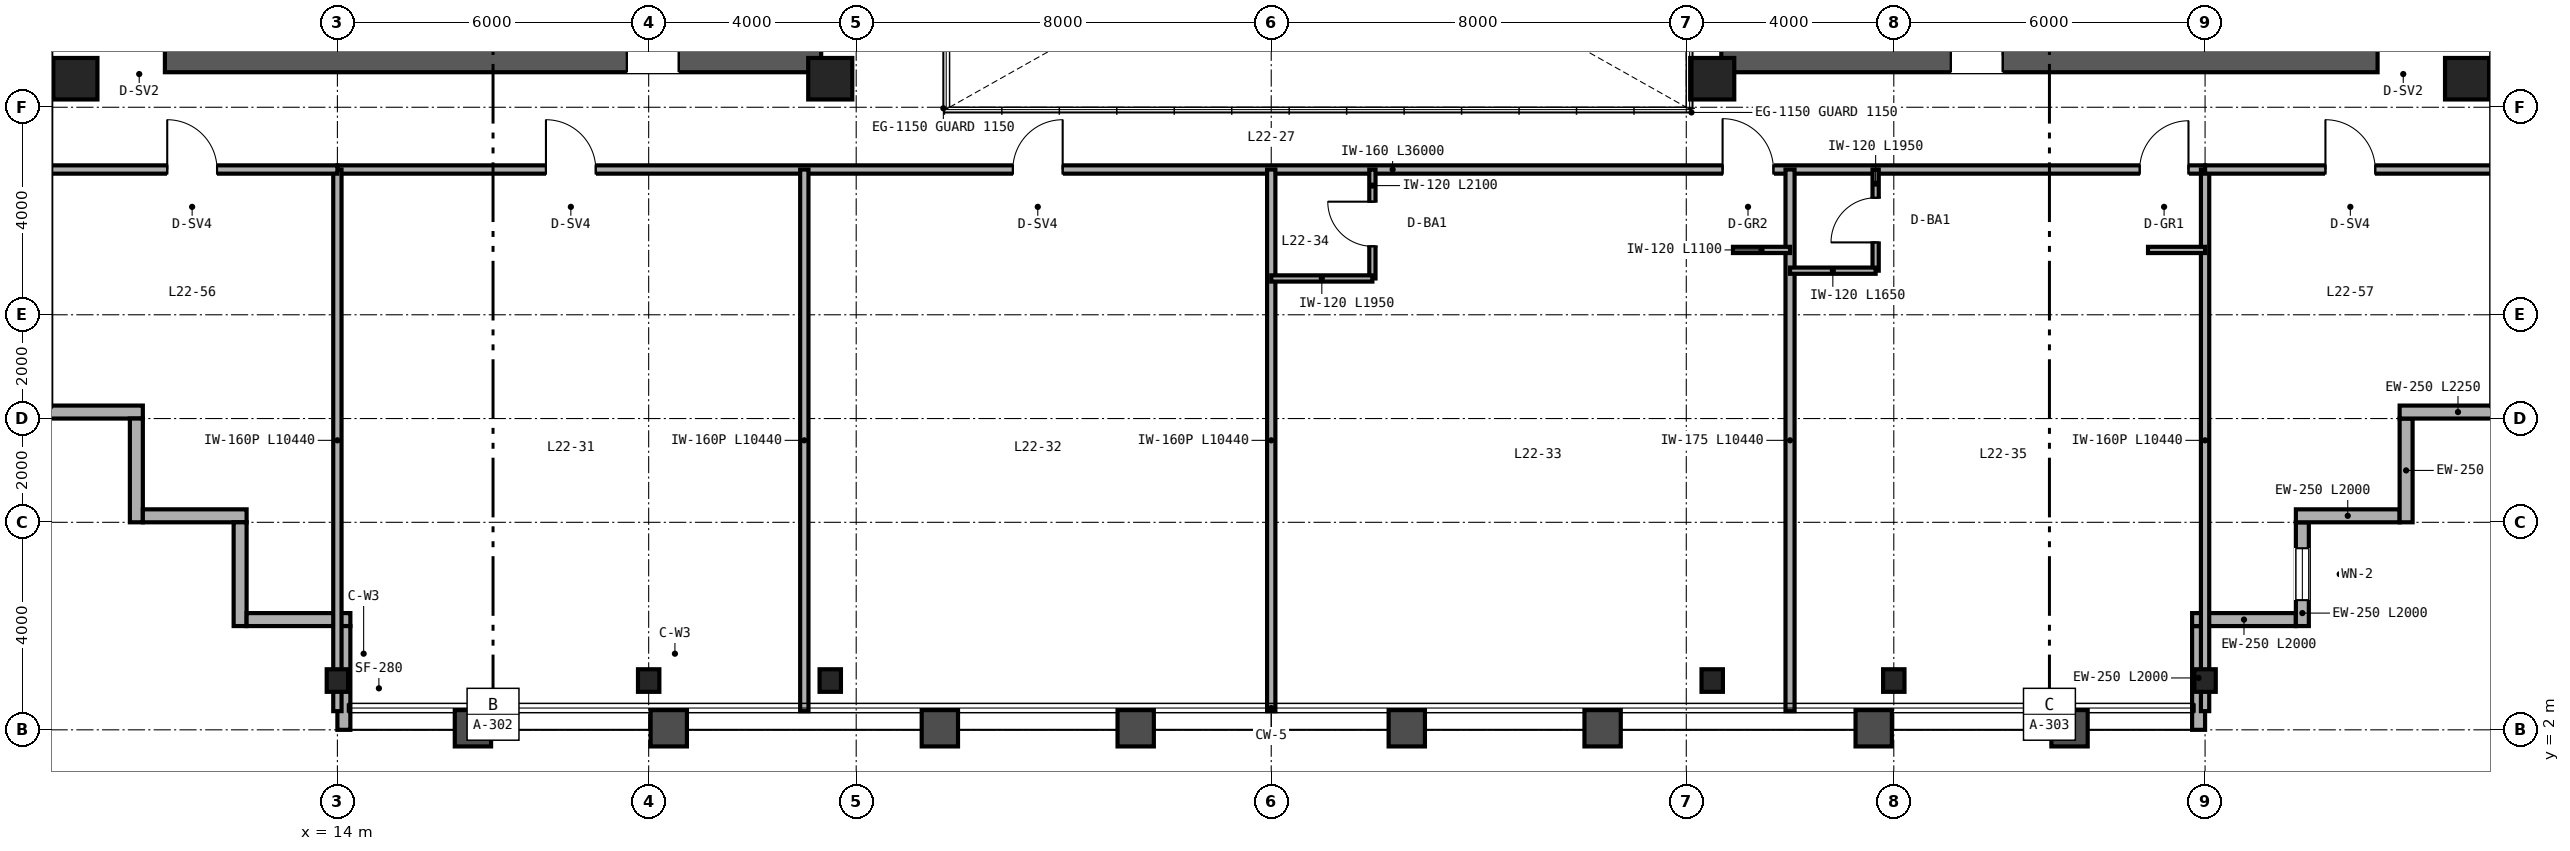
"""IFC4 building model, lengths in metres.
Left out: names, types, materials, properties, quantities, classifications, styles, units other than length and angle.
Written with IfcOpenShell. Run it as: python <this file> out.ifc"""

import sys

from ifc_helpers import new_model, si_unit, direction, frame, frame_2d, origin, origin_2d, place, context, subcontext, project, spatial, rectangle, hollow_rectangle, i_section, extrude, source, transform, mapped, element, fill, save


model = new_model("IFC4")
c1 = context("Model", 3, precision=1e-05, world=origin(), true_north=direction((0.0, 1.0)))
c2 = subcontext(c1, "Body", "Model", "MODEL_VIEW")
j1 = project(units=[si_unit("LENGTHUNIT", "METRE"), si_unit("PLANEANGLEUNIT", "RADIAN")], contexts=[c1])
p1 = place(None, origin())
s1 = spatial("IfcSite", under=j1, at=p1, CompositionType="ELEMENT")
p2 = place(p1, origin())
s2 = spatial("IfcBuilding", under=s1, at=p2, CompositionType="ELEMENT")
p3 = place(p2, frame((0.0, 0.0, 92.4)))
s3 = spatial("IfcBuildingStorey", under=s2, at=p3, CompositionType="ELEMENT", Elevation=92.4)
p4 = place(p3, frame((10.675, 15.0, 0.0), z_axis=(0.0, 0.0, 1.0), x_axis=(1.0, 0.0, 0.0)))
e1 = element("IfcWall", 1, at=p4, inside=s3, PredefinedType="SHEAR", context=c2, shape_type="SweptSolid", body=[
    extrude(rectangle(XDim=12.65, YDim=0.65, at=frame_2d((6.325, 0.0))), origin(), (0.0, 0.0, 1.0), 4.56),
])
p5 = place(p4, frame((8.905, 0.0, 0.0)))
e2 = element("IfcOpeningElement", 2, at=p5, cuts=e1, PredefinedType="OPENING", context=c2, shape_type="SweptSolid", body=[
    extrude(rectangle(XDim=1.0, YDim=2.15, at=frame_2d((0.5, 1.075))), frame((0.0, 0.335, 0.0), z_axis=(0.0, -1.0, 0.0), x_axis=(1.0, 0.0, 0.0)), (0.0, 0.0, 1.0), 0.67),
])
p6 = place(p3, frame((40.675, 15.0, 0.0), z_axis=(0.0, 0.0, 1.0), x_axis=(1.0, 0.0, 0.0)))
e3 = element("IfcWall", 3, at=p6, inside=s3, PredefinedType="SHEAR", context=c2, shape_type="SweptSolid", body=[
    extrude(rectangle(XDim=12.65, YDim=0.65, at=frame_2d((6.325, 0.0))), origin(), (0.0, 0.0, 1.0), 4.56),
])
p7 = place(p6, frame((4.425, 0.0, 0.0)))
e4 = element("IfcOpeningElement", 4, at=p7, cuts=e3, PredefinedType="OPENING", context=c2, shape_type="SweptSolid", body=[
    extrude(rectangle(XDim=1.0, YDim=2.15, at=frame_2d((0.5, 1.075))), frame((0.0, 0.335, 0.0), z_axis=(0.0, -1.0, 0.0), x_axis=(1.0, 0.0, 0.0)), (0.0, 0.0, 1.0), 0.67),
])
m1 = source(origin(), c2, "Body", "SweptSolid", [
    extrude(hollow_rectangle(XDim=0.85, YDim=0.8, WallThickness=0.032, at=origin_2d()), origin(), (0.0, 0.0, 1.0), 4.56),
])
for number, where, z_axis, x_axis in (
    (5, (8.95, 14.55, 0.0), (0.0, 0.0, 1.0), (1.0, 0.0, 0.0)),
    (6, (23.5, 14.55, 0.0), (0.0, 0.0, 1.0), (1.0, 0.0, 0.0)),
    (7, (40.5, 14.55, 0.0), (0.0, 0.0, 1.0), (1.0, 0.0, 0.0)),
    (8, (55.05, 14.55, 0.0), (0.0, 0.0, 1.0), (1.0, 0.0, 0.0)),
):
    element("IfcColumn", number, at=place(p3, frame(where, z_axis=z_axis, x_axis=x_axis)), inside=s3, PredefinedType="COLUMN", context=c2, shape_type="MappedRepresentation", body=[
        mapped(m1, transform((0.0, 0.0, 0.0), scale=1.0)),
    ])
m2 = source(origin(), c2, "Body", "SweptSolid", [
    extrude(i_section(OverallWidth=0.412, OverallDepth=0.435, WebThickness=0.036, FlangeThickness=0.057, FilletRadius=0.025, at=origin_2d()), origin(), (0.0, 0.0, 1.0), 4.56),
])
for number, where, z_axis, x_axis in (
    (9, (14.0, 2.95, 0.0), (0.0, 0.0, 1.0), (1.0, 0.0, 0.0)),
    (10, (20.0, 2.95, 0.0), (0.0, 0.0, 1.0), (1.0, 0.0, 0.0)),
    (11, (23.5, 2.95, 0.0), (0.0, 0.0, 1.0), (1.0, 0.0, 0.0)),
    (12, (40.5, 2.95, 0.0), (0.0, 0.0, 1.0), (1.0, 0.0, 0.0)),
    (13, (44.0, 2.95, 0.0), (0.0, 0.0, 1.0), (1.0, 0.0, 0.0)),
    (14, (50.0, 2.95, 0.0), (0.0, 0.0, 1.0), (1.0, 0.0, 0.0)),
):
    element("IfcColumn", number, at=place(p3, frame(where, z_axis=z_axis, x_axis=x_axis)), inside=s3, PredefinedType="COLUMN", context=c2, shape_type="MappedRepresentation", body=[
        mapped(m2, transform((0.0, 0.0, 0.0), scale=1.0)),
    ])
p8 = place(p3, frame((49.875, 2.0, 0.0), z_axis=(0.0, 0.0, 1.0), x_axis=(0.0, 1.0, 0.0)))
e15 = element("IfcWall", 15, at=p8, inside=s3, PredefinedType="SOLIDWALL", context=c2, shape_type="SweptSolid", body=[
    extrude(rectangle(XDim=2.0, YDim=0.25, at=frame_2d((1.0, 0.0))), origin(), (0.0, 0.0, 1.0), 3.867),
])
p9 = place(p3, frame((49.75, 4.125, 0.0), z_axis=(0.0, 0.0, 1.0), x_axis=(1.0, 0.0, 0.0)))
e16 = element("IfcWall", 16, at=p9, inside=s3, PredefinedType="SOLIDWALL", context=c2, shape_type="SweptSolid", body=[
    extrude(rectangle(XDim=2.0, YDim=0.25, at=frame_2d((1.0, 0.0))), origin(), (0.0, 0.0, 1.0), 4.56),
])
p10 = place(p3, frame((51.875, 4.0, 0.0), z_axis=(0.0, 0.0, 1.0), x_axis=(0.0, 1.0, 0.0)))
e17 = element("IfcWall", 17, at=p10, inside=s3, PredefinedType="SOLIDWALL", context=c2, shape_type="SweptSolid", body=[
    extrude(rectangle(XDim=2.0, YDim=0.25, at=frame_2d((1.0, 0.0))), origin(), (0.0, 0.0, 1.0), 4.56),
])
p11 = place(p10, frame((0.5, 0.0, 0.85)))
e18 = element("IfcOpeningElement", 18, at=p11, cuts=e17, PredefinedType="OPENING", context=c2, shape_type="SweptSolid", body=[
    extrude(rectangle(XDim=1.0, YDim=1.9, at=frame_2d((0.5, 0.95))), frame((0.0, 0.135, 0.0), z_axis=(0.0, -1.0, 0.0), x_axis=(1.0, 0.0, 0.0)), (0.0, 0.0, 1.0), 0.27),
])
for number, where, z_axis, x_axis in (
    (19, (51.75, 6.125, 0.0), (0.0, 0.0, 1.0), (1.0, 0.0, 0.0)),
    (20, (53.875, 6.0, 0.0), (0.0, 0.0, 1.0), (0.0, 1.0, 0.0)),
):
    element("IfcWall", number, at=place(p3, frame(where, z_axis=z_axis, x_axis=x_axis)), inside=s3, PredefinedType="SOLIDWALL", context=c2, shape_type="SweptSolid", body=[
        extrude(rectangle(XDim=2.0, YDim=0.25, at=frame_2d((1.0, 0.0))), origin(), (0.0, 0.0, 1.0), 4.56),
    ])
for number, where, z_axis, x_axis in (
    (21, (53.75, 8.125, 0.0), (0.0, 0.0, 1.0), (1.0, 0.0, 0.0)),
    (22, (8.0, 8.125, 0.0), (0.0, 0.0, 1.0), (1.0, 0.0, 0.0)),
):
    element("IfcWall", number, at=place(p3, frame(where, z_axis=z_axis, x_axis=x_axis)), inside=s3, PredefinedType="SOLIDWALL", context=c2, shape_type="SweptSolid", body=[
        extrude(rectangle(XDim=2.25, YDim=0.25, at=frame_2d((1.125, 0.0))), origin(), (0.0, 0.0, 1.0), 4.56),
    ])
for number, where, z_axis, x_axis in (
    (23, (10.125, 8.0, 0.0), (0.0, 0.0, 1.0), (0.0, -1.0, 0.0)),
    (24, (10.25, 6.125, 0.0), (0.0, 0.0, 1.0), (1.0, 0.0, 0.0)),
    (25, (12.125, 6.0, 0.0), (0.0, 0.0, 1.0), (0.0, -1.0, 0.0)),
    (26, (12.25, 4.125, 0.0), (0.0, 0.0, 1.0), (1.0, 0.0, 0.0)),
):
    element("IfcWall", number, at=place(p3, frame(where, z_axis=z_axis, x_axis=x_axis)), inside=s3, PredefinedType="SOLIDWALL", context=c2, shape_type="SweptSolid", body=[
        extrude(rectangle(XDim=2.0, YDim=0.25, at=frame_2d((1.0, 0.0))), origin(), (0.0, 0.0, 1.0), 4.56),
    ])
p12 = place(p3, frame((14.125, 4.0, 0.0), z_axis=(0.0, 0.0, 1.0), x_axis=(0.0, -1.0, 0.0)))
e27 = element("IfcWall", 27, at=p12, inside=s3, PredefinedType="SOLIDWALL", context=c2, shape_type="SweptSolid", body=[
    extrude(rectangle(XDim=2.0, YDim=0.25, at=frame_2d((1.0, 0.0))), origin(), (0.0, 0.0, 1.0), 3.867),
])
p13 = place(p3, frame((14.0, 12.8, 0.0), z_axis=(0.0, 0.0, 1.0), x_axis=(1.0, 0.0, 0.0)))
e28 = element("IfcWall", 28, at=p13, inside=s3, PredefinedType="PARTITIONING", context=c2, shape_type="SweptSolid", body=[
    extrude(rectangle(XDim=36.0, YDim=0.16, at=frame_2d((18.0, 0.0))), origin(), (0.0, 0.0, 1.0), 3.781),
])
p14 = place(p13, frame((4.02, 0.0, 0.0)))
e29 = element("IfcOpeningElement", 29, at=p14, cuts=e28, PredefinedType="OPENING", context=c2, shape_type="SweptSolid", body=[
    extrude(rectangle(XDim=0.96, YDim=2.15, at=frame_2d((0.48, 1.075))), frame((0.0, 0.09, 0.0), z_axis=(0.0, -1.0, 0.0), x_axis=(1.0, 0.0, 0.0)), (0.0, 0.0, 1.0), 0.18),
])
p15 = place(p13, frame((13.02, 0.0, 0.0)))
e30 = element("IfcOpeningElement", 30, at=p15, cuts=e28, PredefinedType="OPENING", context=c2, shape_type="SweptSolid", body=[
    extrude(rectangle(XDim=0.96, YDim=2.15, at=frame_2d((0.48, 1.075))), frame((0.0, 0.09, 0.0), z_axis=(0.0, -1.0, 0.0), x_axis=(1.0, 0.0, 0.0)), (0.0, 0.0, 1.0), 0.18),
])
p16 = place(p13, frame((26.7, 0.0, 0.0)))
e31 = element("IfcOpeningElement", 31, at=p16, cuts=e28, PredefinedType="OPENING", context=c2, shape_type="SweptSolid", body=[
    extrude(rectangle(XDim=0.98, YDim=2.2, at=frame_2d((0.49, 1.1))), frame((0.0, 0.09, 0.0), z_axis=(0.0, -1.0, 0.0), x_axis=(1.0, 0.0, 0.0)), (0.0, 0.0, 1.0), 0.18),
])
p17 = place(p13, frame((34.74, 0.0, 0.0)))
e32 = element("IfcOpeningElement", 32, at=p17, cuts=e28, PredefinedType="OPENING", context=c2, shape_type="SweptSolid", body=[
    extrude(rectangle(XDim=0.94, YDim=2.15, at=frame_2d((0.47, 1.075))), frame((0.0, 0.09, 0.0), z_axis=(0.0, -1.0, 0.0), x_axis=(1.0, 0.0, 0.0)), (0.0, 0.0, 1.0), 0.18),
])
for number, where, z_axis, x_axis in (
    (33, (14.0, 2.36, 0.0), (0.0, 0.0, 1.0), (0.0, 1.0, 0.0)),
    (34, (50.0, 2.36, 0.0), (0.0, 0.0, 1.0), (0.0, 1.0, 0.0)),
):
    element("IfcWall", number, at=place(p3, frame(where, z_axis=z_axis, x_axis=x_axis)), inside=s3, PredefinedType="PARTITIONING", context=c2, shape_type="SweptSolid", body=[
        extrude(rectangle(XDim=10.44, YDim=0.16, at=frame_2d((5.22, 0.0))), origin(), (0.0, 0.0, 1.0), 3.867),
    ])
p18 = place(p3, frame((23.0, 2.36, 0.0), z_axis=(0.0, 0.0, 1.0), x_axis=(0.0, 1.0, 0.0)))
e35 = element("IfcWall", 35, at=p18, inside=s3, PredefinedType="PARTITIONING", context=c2, shape_type="SweptSolid", body=[
    extrude(rectangle(XDim=10.44, YDim=0.16, at=frame_2d((5.22, 0.0))), origin(), (0.0, 0.0, 1.0), 4.023),
])
p19 = place(p3, frame((32.0, 2.36, 0.0), z_axis=(0.0, 0.0, 1.0), x_axis=(0.0, 1.0, 0.0)))
e36 = element("IfcWall", 36, at=p19, inside=s3, PredefinedType="PARTITIONING", context=c2, shape_type="SweptSolid", body=[
    extrude(rectangle(XDim=10.44, YDim=0.16, at=frame_2d((5.22, 0.0))), origin(), (0.0, 0.0, 1.0), 3.633),
])
p20 = place(p3, frame((42.0, 2.36, 0.0), z_axis=(0.0, 0.0, 1.0), x_axis=(0.0, 1.0, 0.0)))
e37 = element("IfcWall", 37, at=p20, inside=s3, PredefinedType="PARTITIONING", context=c2, shape_type="SweptSolid", body=[
    extrude(rectangle(XDim=10.44, YDim=0.175, at=frame_2d((5.22, 0.0))), origin(), (0.0, 0.0, 1.0), 4.023),
])
p21 = place(p3, frame((33.95, 10.7, 0.0), z_axis=(0.0, 0.0, 1.0), x_axis=(0.0, 1.0, 0.0)))
e38 = element("IfcWall", 38, at=p21, inside=s3, PredefinedType="PARTITIONING", context=c2, shape_type="SweptSolid", body=[
    extrude(rectangle(XDim=2.1, YDim=0.12, at=frame_2d((1.05, 0.0))), origin(), (0.0, 0.0, 1.0), 4.56),
])
p22 = place(p21, frame((0.62, 0.0, 0.0)))
e39 = element("IfcOpeningElement", 39, at=p22, cuts=e38, PredefinedType="OPENING", context=c2, shape_type="SweptSolid", body=[
    extrude(rectangle(XDim=0.86, YDim=2.1, at=frame_2d((0.43, 1.05))), frame((0.0, 0.07, 0.0), z_axis=(0.0, -1.0, 0.0), x_axis=(1.0, 0.0, 0.0)), (0.0, 0.0, 1.0), 0.14),
])
p23 = place(p3, frame((32.0, 10.7, 0.0), z_axis=(0.0, 0.0, 1.0), x_axis=(1.0, 0.0, 0.0)))
e40 = element("IfcWall", 40, at=p23, inside=s3, PredefinedType="PARTITIONING", context=c2, shape_type="SweptSolid", body=[
    extrude(rectangle(XDim=1.95, YDim=0.12, at=frame_2d((0.975, 0.0))), origin(), (0.0, 0.0, 1.0), 4.56),
])
p24 = place(p3, frame((40.9, 11.25, 0.0), z_axis=(0.0, 0.0, 1.0), x_axis=(1.0, 0.0, 0.0)))
e41 = element("IfcWall", 41, at=p24, inside=s3, PredefinedType="PARTITIONING", context=c2, shape_type="SweptSolid", body=[
    extrude(rectangle(XDim=1.1, YDim=0.12, at=frame_2d((0.55, 0.0))), origin(), (0.0, 0.0, 1.0), 4.56),
])
p25 = place(p3, frame((43.65, 10.85, 0.0), z_axis=(0.0, 0.0, 1.0), x_axis=(0.0, 1.0, 0.0)))
e42 = element("IfcWall", 42, at=p25, inside=s3, PredefinedType="PARTITIONING", context=c2, shape_type="SweptSolid", body=[
    extrude(rectangle(XDim=1.95, YDim=0.12, at=frame_2d((0.975, 0.0))), origin(), (0.0, 0.0, 1.0), 4.56),
])
p26 = place(p25, frame((0.545, 0.0, 0.0)))
e43 = element("IfcOpeningElement", 43, at=p26, cuts=e42, PredefinedType="OPENING", context=c2, shape_type="SweptSolid", body=[
    extrude(rectangle(XDim=0.86, YDim=2.1, at=frame_2d((0.43, 1.05))), frame((0.0, 0.07, 0.0), z_axis=(0.0, -1.0, 0.0), x_axis=(1.0, 0.0, 0.0)), (0.0, 0.0, 1.0), 0.14),
])
p27 = place(p3, frame((42.0, 10.85, 0.0), z_axis=(0.0, 0.0, 1.0), x_axis=(1.0, 0.0, 0.0)))
e44 = element("IfcWall", 44, at=p27, inside=s3, PredefinedType="PARTITIONING", context=c2, shape_type="SweptSolid", body=[
    extrude(rectangle(XDim=1.65, YDim=0.12, at=frame_2d((0.825, 0.0))), origin(), (0.0, 0.0, 1.0), 4.56),
])
p28 = place(p3, frame((48.9, 11.25, 0.0), z_axis=(0.0, 0.0, 1.0), x_axis=(1.0, 0.0, 0.0)))
e45 = element("IfcWall", 45, at=p28, inside=s3, PredefinedType="PARTITIONING", context=c2, shape_type="SweptSolid", body=[
    extrude(rectangle(XDim=1.1, YDim=0.12, at=frame_2d((0.55, 0.0))), origin(), (0.0, 0.0, 1.0), 4.56),
])
p29 = place(p3, frame((8.4, 12.8, 0.0), z_axis=(0.0, 0.0, 1.0), x_axis=(1.0, 0.0, 0.0)))
e46 = element("IfcWall", 46, at=p29, inside=s3, PredefinedType="PARTITIONING", context=c2, shape_type="SweptSolid", body=[
    extrude(rectangle(XDim=5.6, YDim=0.16, at=frame_2d((2.8, 0.0))), origin(), (0.0, 0.0, 1.0), 4.56),
])
p30 = place(p29, frame((2.32, 0.0, 0.0)))
e47 = element("IfcOpeningElement", 47, at=p30, cuts=e46, PredefinedType="OPENING", context=c2, shape_type="SweptSolid", body=[
    extrude(rectangle(XDim=0.96, YDim=2.15, at=frame_2d((0.48, 1.075))), frame((0.0, 0.09, 0.0), z_axis=(0.0, -1.0, 0.0), x_axis=(1.0, 0.0, 0.0)), (0.0, 0.0, 1.0), 0.18),
])
p31 = place(p3, frame((50.0, 12.8, 0.0), z_axis=(0.0, 0.0, 1.0), x_axis=(1.0, 0.0, 0.0)))
e48 = element("IfcWall", 48, at=p31, inside=s3, PredefinedType="PARTITIONING", context=c2, shape_type="SweptSolid", body=[
    extrude(rectangle(XDim=5.6, YDim=0.16, at=frame_2d((2.8, 0.0))), origin(), (0.0, 0.0, 1.0), 4.56),
])
p32 = place(p31, frame((2.32, 0.0, 0.0)))
e49 = element("IfcOpeningElement", 49, at=p32, cuts=e48, PredefinedType="OPENING", context=c2, shape_type="SweptSolid", body=[
    extrude(rectangle(XDim=0.96, YDim=2.15, at=frame_2d((0.48, 1.075))), frame((0.0, 0.09, 0.0), z_axis=(0.0, -1.0, 0.0), x_axis=(1.0, 0.0, 0.0)), (0.0, 0.0, 1.0), 0.18),
])
m3 = source(origin(), c2, "Body", "SweptSolid", [
    extrude(rectangle(XDim=1.0, YDim=1.9, at=frame_2d((0.5, 0.95))), frame((0.0, 0.03, 0.0), z_axis=(0.0, -1.0, 0.0), x_axis=(1.0, 0.0, 0.0)), (0.0, 0.0, 1.0), 0.06),
])
p33 = place(p11, origin())
e50 = element("IfcWindow", 50, at=p33, inside=s3, PartitioningType="SINGLE_PANEL", PredefinedType="WINDOW", context=c2, shape_type="MappedRepresentation", body=[
    mapped(m3, transform((0.0, 0.0, 0.0), scale=1.0)),
])
fill(e18, e50)
m4 = source(origin(), c2, "Body", "SweptSolid", [
    extrude(rectangle(XDim=1.0, YDim=2.15, at=frame_2d((0.5, 1.075))), frame((0.0, 0.025, 0.0), z_axis=(0.0, -1.0, 0.0), x_axis=(1.0, 0.0, 0.0)), (0.0, 0.0, 1.0), 0.05),
])
p34 = place(p5, origin())
e51 = element("IfcDoor", 51, at=p34, inside=s3, OperationType="SINGLE_SWING_LEFT", PredefinedType="DOOR", context=c2, shape_type="MappedRepresentation", body=[
    mapped(m4, transform((0.0, 0.0, 0.0), scale=1.0)),
])
fill(e2, e51)
p35 = place(p7, origin())
e52 = element("IfcDoor", 52, at=p35, inside=s3, OperationType="SINGLE_SWING_RIGHT", PredefinedType="DOOR", context=c2, shape_type="MappedRepresentation", body=[
    mapped(m4, transform((0.0, 0.0, 0.0), scale=1.0)),
])
fill(e4, e52)
m5 = source(origin(), c2, "Body", "SweptSolid", [
    extrude(rectangle(XDim=0.86, YDim=2.1, at=frame_2d((0.43, 1.05))), frame((0.0, 0.025, 0.0), z_axis=(0.0, -1.0, 0.0), x_axis=(1.0, 0.0, 0.0)), (0.0, 0.0, 1.0), 0.05),
])
p36 = place(p22, origin())
e53 = element("IfcDoor", 53, at=p36, inside=s3, OperationType="SINGLE_SWING_RIGHT", PredefinedType="DOOR", context=c2, shape_type="MappedRepresentation", body=[
    mapped(m5, transform((0.0, 0.0, 0.0), scale=1.0)),
])
fill(e39, e53)
p37 = place(p26, origin())
e54 = element("IfcDoor", 54, at=p37, inside=s3, OperationType="SINGLE_SWING_LEFT", PredefinedType="DOOR", context=c2, shape_type="MappedRepresentation", body=[
    mapped(m5, transform((0.0, 0.0, 0.0), scale=1.0)),
])
fill(e43, e54)
m6 = source(origin(), c2, "Body", "SweptSolid", [
    extrude(rectangle(XDim=0.96, YDim=2.15, at=frame_2d((0.48, 1.075))), frame((0.0, 0.025, 0.0), z_axis=(0.0, -1.0, 0.0), x_axis=(1.0, 0.0, 0.0)), (0.0, 0.0, 1.0), 0.05),
])
p38 = place(p14, origin())
e55 = element("IfcDoor", 55, at=p38, inside=s3, OperationType="SINGLE_SWING_LEFT", PredefinedType="DOOR", context=c2, shape_type="MappedRepresentation", body=[
    mapped(m6, transform((0.0, 0.0, 0.0), scale=1.0)),
])
fill(e29, e55)
p39 = place(p15, origin())
e56 = element("IfcDoor", 56, at=p39, inside=s3, OperationType="SINGLE_SWING_RIGHT", PredefinedType="DOOR", context=c2, shape_type="MappedRepresentation", body=[
    mapped(m6, transform((0.0, 0.0, 0.0), scale=1.0)),
])
fill(e30, e56)
m7 = source(origin(), c2, "Body", "SweptSolid", [
    extrude(rectangle(XDim=0.98, YDim=2.2, at=frame_2d((0.49, 1.1))), frame((0.0, 0.025, 0.0), z_axis=(0.0, -1.0, 0.0), x_axis=(1.0, 0.0, 0.0)), (0.0, 0.0, 1.0), 0.05),
])
p40 = place(p16, origin())
e57 = element("IfcDoor", 57, at=p40, inside=s3, OperationType="SINGLE_SWING_LEFT", PredefinedType="DOOR", context=c2, shape_type="MappedRepresentation", body=[
    mapped(m7, transform((0.0, 0.0, 0.0), scale=1.0)),
])
fill(e31, e57)
m8 = source(origin(), c2, "Body", "SweptSolid", [
    extrude(rectangle(XDim=0.94, YDim=2.15, at=frame_2d((0.47, 1.075))), frame((0.0, 0.025, 0.0), z_axis=(0.0, -1.0, 0.0), x_axis=(1.0, 0.0, 0.0)), (0.0, 0.0, 1.0), 0.05),
])
p41 = place(p17, origin())
e58 = element("IfcDoor", 58, at=p41, inside=s3, OperationType="SINGLE_SWING_RIGHT", PredefinedType="DOOR", context=c2, shape_type="MappedRepresentation", body=[
    mapped(m8, transform((0.0, 0.0, 0.0), scale=1.0)),
])
fill(e32, e58)
p42 = place(p30, origin())
e59 = element("IfcDoor", 59, at=p42, inside=s3, OperationType="SINGLE_SWING_LEFT", PredefinedType="DOOR", context=c2, shape_type="MappedRepresentation", body=[
    mapped(m6, transform((0.0, 0.0, 0.0), scale=1.0)),
])
fill(e47, e59)
p43 = place(p32, origin())
e60 = element("IfcDoor", 60, at=p43, inside=s3, OperationType="SINGLE_SWING_LEFT", PredefinedType="DOOR", context=c2, shape_type="MappedRepresentation", body=[
    mapped(m6, transform((0.0, 0.0, 0.0), scale=1.0)),
])
fill(e49, e60)
save(model, sys.argv[1])
